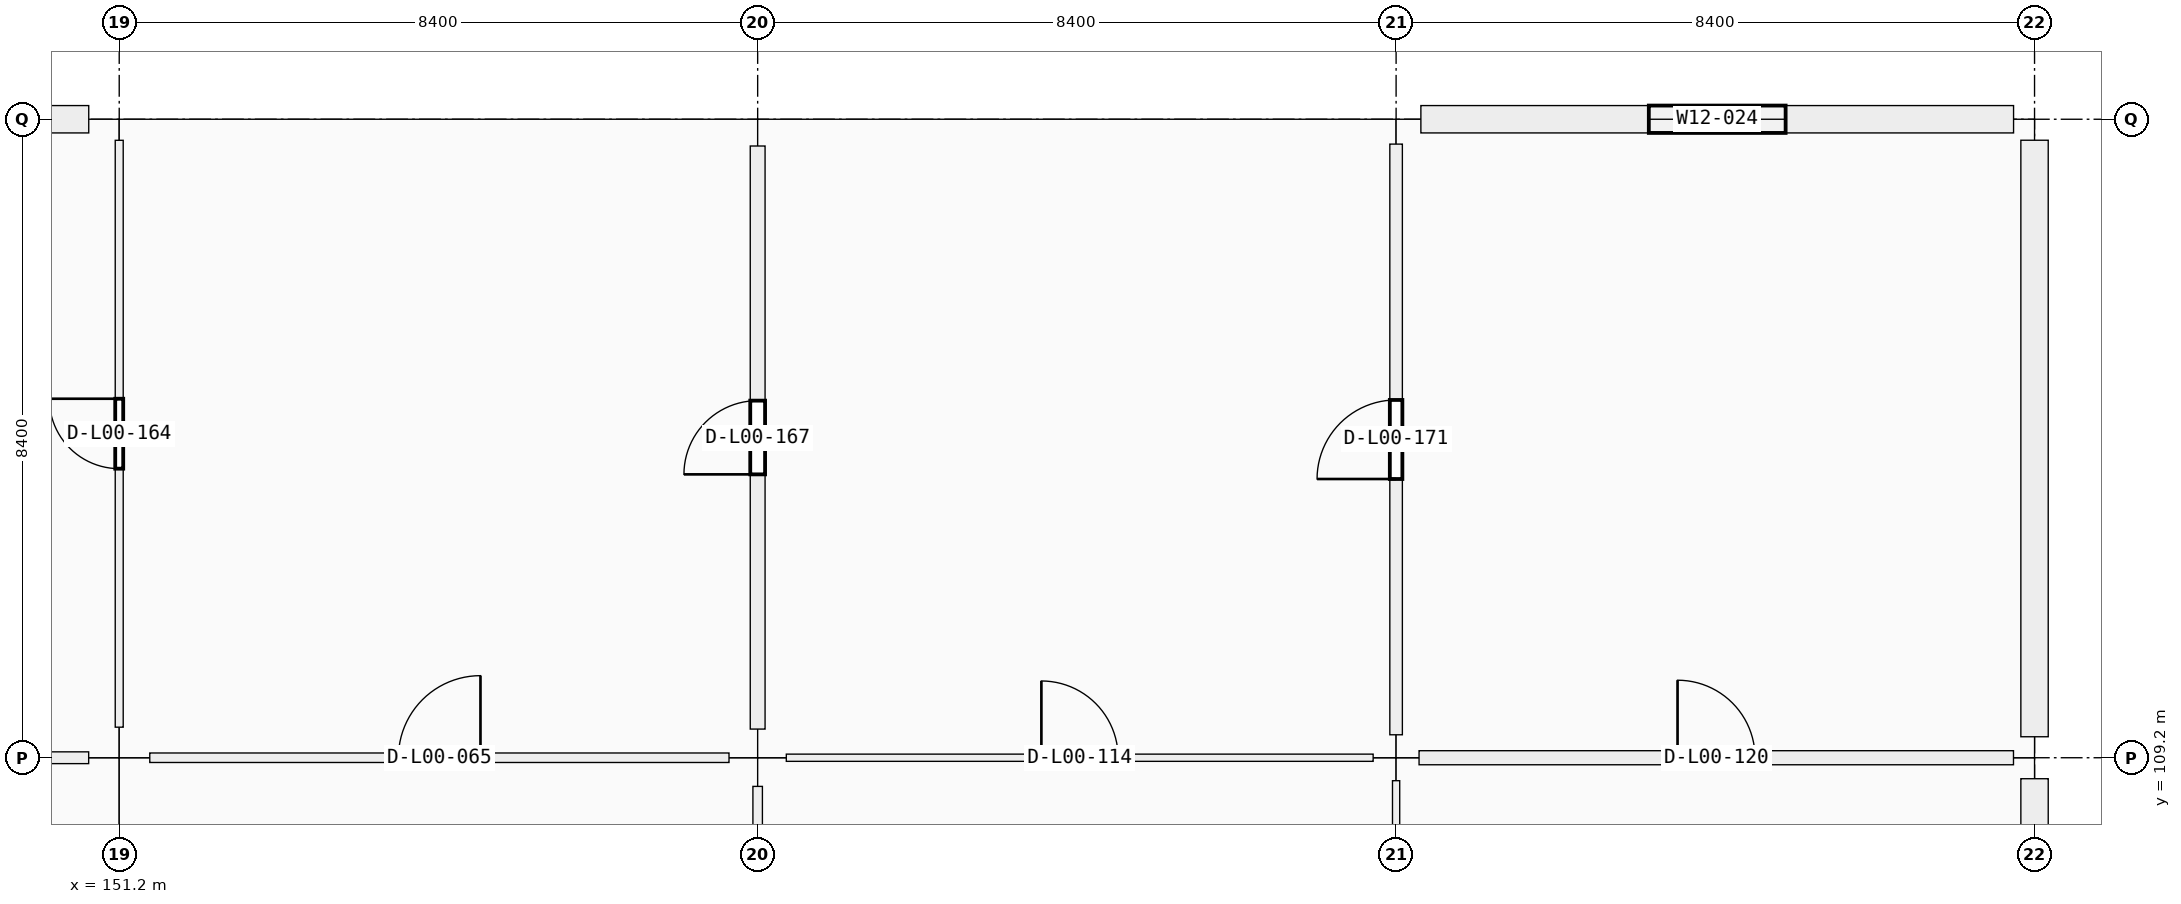
"""IFC4 building model, lengths in metres.
Left out: names, types, materials, properties, quantities, classifications, styles, units other than length and angle.
Written with IfcOpenShell. Run it as: python <this file> out.ifc"""

import sys

from ifc_helpers import new_model, si_unit, direction, frame, frame_2d, origin, origin_2d, place, context, subcontext, project, spatial, rectangle, extrude, element, fill, save


model = new_model("IFC4")
c1 = context("Model", 3, precision=1e-05, world=origin(), true_north=direction((0.0, 1.0)))
c2 = subcontext(c1, "Body", "Model", "MODEL_VIEW")
j1 = project(units=[si_unit("LENGTHUNIT", "METRE"), si_unit("PLANEANGLEUNIT", "RADIAN")], contexts=[c1])
p1 = place(None, origin())
s1 = spatial("IfcSite", under=j1, at=p1, CompositionType="ELEMENT")
p2 = place(p1, origin())
s2 = spatial("IfcBuilding", under=s1, at=p2, CompositionType="ELEMENT")
p3 = place(p2, origin())
s3 = spatial("IfcBuildingStorey", under=s2, at=p3, CompositionType="ELEMENT", Elevation=0.0)
p4 = place(p3, frame((151.2, 109.2, 0.0), z_axis=(0.0, 0.0, 1.0), x_axis=(1.0, 0.0, 0.0)))
e1 = element("IfcColumn", 1, at=p4, inside=s3, PredefinedType="COLUMN", context=c2, shape_type="SweptSolid", body=[
    extrude(rectangle(XDim=0.8, YDim=0.8, at=origin_2d()), origin(), (0.0, 0.0, 1.0), 5.76),
])
p5 = place(p3, frame((151.2, 117.6, 0.0), z_axis=(0.0, 0.0, 1.0), x_axis=(1.0, 0.0, 0.0)))
e2 = element("IfcColumn", 2, at=p5, inside=s3, PredefinedType="COLUMN", context=c2, shape_type="SweptSolid", body=[
    extrude(rectangle(XDim=0.8, YDim=0.55, at=origin_2d()), origin(), (0.0, 0.0, 1.0), 5.76),
])
p6 = place(p3, frame((159.6, 109.2, 0.0), z_axis=(0.0, 0.0, 1.0), x_axis=(1.0, 0.0, 0.0)))
e3 = element("IfcColumn", 3, at=p6, inside=s3, PredefinedType="COLUMN", context=c2, shape_type="SweptSolid", body=[
    extrude(rectangle(XDim=0.75, YDim=0.75, at=origin_2d()), origin(), (0.0, 0.0, 1.0), 5.76),
])
p7 = place(p3, frame((159.6, 117.6, 0.0), z_axis=(0.0, 0.0, 1.0), x_axis=(1.0, 0.0, 0.0)))
e4 = element("IfcColumn", 4, at=p7, inside=s3, PredefinedType="COLUMN", context=c2, shape_type="SweptSolid", body=[
    extrude(rectangle(XDim=0.7, YDim=0.7, at=origin_2d()), origin(), (0.0, 0.0, 1.0), 5.76),
])
p8 = place(p3, frame((168.0, 109.2, 0.0), z_axis=(0.0, 0.0, 1.0), x_axis=(1.0, 0.0, 0.0)))
e5 = element("IfcColumn", 5, at=p8, inside=s3, PredefinedType="COLUMN", context=c2, shape_type="SweptSolid", body=[
    extrude(rectangle(XDim=0.6, YDim=0.6, at=origin_2d()), origin(), (0.0, 0.0, 1.0), 5.76),
])
p9 = place(p3, frame((168.0, 117.6, 0.0), z_axis=(0.0, 0.0, 1.0), x_axis=(1.0, 0.0, 0.0)))
e6 = element("IfcColumn", 6, at=p9, inside=s3, PredefinedType="COLUMN", context=c2, shape_type="SweptSolid", body=[
    extrude(rectangle(XDim=0.65, YDim=0.65, at=origin_2d()), origin(), (0.0, 0.0, 1.0), 5.76),
])
for number, where, z_axis, x_axis in (
    (7, (176.4, 109.2, 0.0), (0.0, 0.0, 1.0), (1.0, 0.0, 0.0)),
    (8, (176.4, 117.6, 0.0), (0.0, 0.0, 1.0), (1.0, 0.0, 0.0)),
):
    element("IfcColumn", number, at=place(p3, frame(where, z_axis=z_axis, x_axis=x_axis)), inside=s3, PredefinedType="COLUMN", context=c2, shape_type="SweptSolid", body=[
        extrude(rectangle(XDim=0.55, YDim=0.55, at=origin_2d()), origin(), (0.0, 0.0, 1.0), 5.51),
    ])
p10 = place(p3, frame((143.201, 117.6, 0.0), z_axis=(0.0, 0.0, 1.0), x_axis=(1.0, 0.0, 0.0)))
e9 = element("IfcWall", 9, at=p10, inside=s3, PredefinedType="SOLIDWALL", context=c2, shape_type="SweptSolid", body=[
    extrude(rectangle(XDim=7.598, YDim=0.36, at=frame_2d((3.799, 0.0))), origin(), (0.0, 0.0, 1.0), 4.7),
])
p11 = place(p10, frame((2.799, 0.0, 0.0)))
e10 = element("IfcOpeningElement", 10, at=p11, cuts=e9, PredefinedType="OPENING", context=c2, shape_type="SweptSolid", body=[
    extrude(rectangle(XDim=2.0, YDim=2.25, at=frame_2d((1.0, 1.125))), frame((0.0, 0.18, 0.0), z_axis=(0.0, -1.0, 0.0), x_axis=(1.0, 0.0, 0.0)), (0.0, 0.0, 1.0), 0.36),
])
p12 = place(p3, frame((176.4, 108.924, 0.0), z_axis=(0.0, 0.0, 1.0), x_axis=(0.0, -1.0, 0.0)))
e11 = element("IfcWall", 11, at=p12, inside=s3, PredefinedType="SOLIDWALL", context=c2, shape_type="SweptSolid", body=[
    extrude(rectangle(XDim=7.848, YDim=0.36, at=frame_2d((3.924, 0.0))), origin(), (0.0, 0.0, 1.0), 4.7),
])
p13 = place(p12, frame((2.824, 0.0, 0.9)))
e12 = element("IfcOpeningElement", 12, at=p13, cuts=e11, PredefinedType="OPENING", context=c2, shape_type="SweptSolid", body=[
    extrude(rectangle(XDim=2.2, YDim=1.35, at=frame_2d((1.1, 0.675))), frame((0.0, 0.18, 0.0), z_axis=(0.0, -1.0, 0.0), x_axis=(1.0, 0.0, 0.0)), (0.0, 0.0, 1.0), 0.36),
])
p14 = place(p3, frame((168.326, 117.6, 0.0), z_axis=(0.0, 0.0, 1.0), x_axis=(1.0, 0.0, 0.0)))
e13 = element("IfcWall", 13, at=p14, inside=s3, PredefinedType="SOLIDWALL", context=c2, shape_type="SweptSolid", body=[
    extrude(rectangle(XDim=7.798, YDim=0.36, at=frame_2d((3.899, 0.0))), origin(), (0.0, 0.0, 1.0), 4.7),
])
p15 = place(p14, frame((2.999, 0.0, 0.9)))
e14 = element("IfcOpeningElement", 14, at=p15, cuts=e13, PredefinedType="OPENING", context=c2, shape_type="SweptSolid", body=[
    extrude(rectangle(XDim=1.8, YDim=1.35, at=frame_2d((0.9, 0.675))), frame((0.0, 0.18, 0.0), z_axis=(0.0, -1.0, 0.0), x_axis=(1.0, 0.0, 0.0)), (0.0, 0.0, 1.0), 0.36),
])
p16 = place(p3, frame((176.4, 117.324, 0.0), z_axis=(0.0, 0.0, 1.0), x_axis=(0.0, -1.0, 0.0)))
e15 = element("IfcWall", 15, at=p16, inside=s3, PredefinedType="SOLIDWALL", context=c2, shape_type="SweptSolid", body=[
    extrude(rectangle(XDim=7.848, YDim=0.36, at=frame_2d((3.924, 0.0))), origin(), (0.0, 0.0, 1.0), 4.7),
])
p17 = place(p16, frame((2.824, 0.0, 0.9)))
e16 = element("IfcOpeningElement", 16, at=p17, cuts=e15, PredefinedType="OPENING", context=c2, shape_type="SweptSolid", body=[
    extrude(rectangle(XDim=2.2, YDim=1.75, at=frame_2d((1.1, 0.875))), frame((0.0, 0.18, 0.0), z_axis=(0.0, -1.0, 0.0), x_axis=(1.0, 0.0, 0.0)), (0.0, 0.0, 1.0), 0.36),
])
p18 = place(p3, frame((143.202, 109.2, 0.0), z_axis=(0.0, 0.0, 1.0), x_axis=(1.0, 0.0, 0.0)))
e17 = element("IfcWall", 17, at=p18, inside=s3, PredefinedType="PARTITIONING", context=c2, shape_type="SweptSolid", body=[
    extrude(rectangle(XDim=7.596, YDim=0.155, at=frame_2d((3.798, 0.0))), origin(), (0.0, 0.0, 1.0), 3.66),
])
p19 = place(p18, frame((3.333, 0.0, 0.0)))
e18 = element("IfcOpeningElement", 18, at=p19, cuts=e17, PredefinedType="OPENING", context=c2, shape_type="SweptSolid", body=[
    extrude(rectangle(XDim=0.93, YDim=2.12, at=frame_2d((0.465, 1.06))), frame((0.0, 0.078, 0.0), z_axis=(0.0, -1.0, 0.0), x_axis=(1.0, 0.0, 0.0)), (0.0, 0.0, 1.0), 0.155),
])
p20 = place(p3, frame((151.602, 109.2, 0.0), z_axis=(0.0, 0.0, 1.0), x_axis=(1.0, 0.0, 0.0)))
e19 = element("IfcWall", 19, at=p20, inside=s3, PredefinedType="PARTITIONING", context=c2, shape_type="SweptSolid", body=[
    extrude(rectangle(XDim=7.621, YDim=0.125, at=frame_2d((3.811, 0.0))), origin(), (0.0, 0.0, 1.0), 3.66),
])
p21 = place(p20, frame((3.271, 0.0, 0.0)))
e20 = element("IfcOpeningElement", 20, at=p21, cuts=e19, PredefinedType="OPENING", context=c2, shape_type="SweptSolid", body=[
    extrude(rectangle(XDim=1.08, YDim=2.25, at=frame_2d((0.54, 1.125))), frame((0.0, 0.062, 0.0), z_axis=(0.0, -1.0, 0.0), x_axis=(1.0, 0.0, 0.0)), (0.0, 0.0, 1.0), 0.125),
])
p22 = place(p3, frame((159.977, 109.2, 0.0), z_axis=(0.0, 0.0, 1.0), x_axis=(1.0, 0.0, 0.0)))
e21 = element("IfcWall", 21, at=p22, inside=s3, PredefinedType="PARTITIONING", context=c2, shape_type="SweptSolid", body=[
    extrude(rectangle(XDim=7.721, YDim=0.095, at=frame_2d((3.86, 0.0))), origin(), (0.0, 0.0, 1.0), 3.66),
])
p23 = place(p22, frame((3.356, 0.0, 0.0)))
e22 = element("IfcOpeningElement", 22, at=p23, cuts=e21, PredefinedType="OPENING", context=c2, shape_type="SweptSolid", body=[
    extrude(rectangle(XDim=1.01, YDim=2.12, at=frame_2d((0.505, 1.06))), frame((0.0, 0.047, 0.0), z_axis=(0.0, -1.0, 0.0), x_axis=(1.0, 0.0, 0.0)), (0.0, 0.0, 1.0), 0.095),
])
p24 = place(p3, frame((168.302, 109.2, 0.0), z_axis=(0.0, 0.0, 1.0), x_axis=(1.0, 0.0, 0.0)))
e23 = element("IfcWall", 23, at=p24, inside=s3, PredefinedType="PARTITIONING", context=c2, shape_type="SweptSolid", body=[
    extrude(rectangle(XDim=7.821, YDim=0.185, at=frame_2d((3.911, 0.0))), origin(), (0.0, 0.0, 1.0), 3.66),
])
p25 = place(p24, frame((3.401, 0.0, 0.0)))
e24 = element("IfcOpeningElement", 24, at=p25, cuts=e23, PredefinedType="OPENING", context=c2, shape_type="SweptSolid", body=[
    extrude(rectangle(XDim=1.02, YDim=2.2, at=frame_2d((0.51, 1.1))), frame((0.0, 0.093, 0.0), z_axis=(0.0, -1.0, 0.0), x_axis=(1.0, 0.0, 0.0)), (0.0, 0.0, 1.0), 0.185),
])
p26 = place(p3, frame((151.2, 109.602, 0.0), z_axis=(0.0, 0.0, 1.0), x_axis=(0.0, 1.0, 0.0)))
e25 = element("IfcWall", 25, at=p26, inside=s3, PredefinedType="PARTITIONING", context=c2, shape_type="SweptSolid", body=[
    extrude(rectangle(XDim=7.721, YDim=0.105, at=frame_2d((3.86, 0.0))), origin(), (0.0, 0.0, 1.0), 3.66),
])
p27 = place(p26, frame((3.401, 0.0, 0.0)))
e26 = element("IfcOpeningElement", 26, at=p27, cuts=e25, PredefinedType="OPENING", context=c2, shape_type="SweptSolid", body=[
    extrude(rectangle(XDim=0.92, YDim=2.15, at=frame_2d((0.46, 1.075))), frame((0.0, 0.052, 0.0), z_axis=(0.0, -1.0, 0.0), x_axis=(1.0, 0.0, 0.0)), (0.0, 0.0, 1.0), 0.105),
])
p28 = place(p3, frame((159.6, 101.152, 0.0), z_axis=(0.0, 0.0, 1.0), x_axis=(0.0, 1.0, 0.0)))
e27 = element("IfcWall", 27, at=p28, inside=s3, PredefinedType="PARTITIONING", context=c2, shape_type="SweptSolid", body=[
    extrude(rectangle(XDim=7.671, YDim=0.125, at=frame_2d((3.835, 0.0))), origin(), (0.0, 0.0, 1.0), 3.66),
])
p29 = place(p28, frame((3.311, 0.0, 0.0)))
e28 = element("IfcOpeningElement", 28, at=p29, cuts=e27, PredefinedType="OPENING", context=c2, shape_type="SweptSolid", body=[
    extrude(rectangle(XDim=1.05, YDim=2.12, at=frame_2d((0.525, 1.06))), frame((0.0, 0.062, 0.0), z_axis=(0.0, -1.0, 0.0), x_axis=(1.0, 0.0, 0.0)), (0.0, 0.0, 1.0), 0.125),
])
p30 = place(p3, frame((159.6, 109.577, 0.0), z_axis=(0.0, 0.0, 1.0), x_axis=(0.0, 1.0, 0.0)))
e29 = element("IfcWall", 29, at=p30, inside=s3, PredefinedType="PARTITIONING", context=c2, shape_type="SweptSolid", body=[
    extrude(rectangle(XDim=7.671, YDim=0.195, at=frame_2d((3.835, 0.0))), origin(), (0.0, 0.0, 1.0), 3.66),
])
p31 = place(p30, frame((3.351, 0.0, 0.0)))
e30 = element("IfcOpeningElement", 30, at=p31, cuts=e29, PredefinedType="OPENING", context=c2, shape_type="SweptSolid", body=[
    extrude(rectangle(XDim=0.97, YDim=2.12, at=frame_2d((0.485, 1.06))), frame((0.0, 0.098, 0.0), z_axis=(0.0, -1.0, 0.0), x_axis=(1.0, 0.0, 0.0)), (0.0, 0.0, 1.0), 0.195),
])
p32 = place(p3, frame((168.0, 101.127, 0.0), z_axis=(0.0, 0.0, 1.0), x_axis=(0.0, 1.0, 0.0)))
e31 = element("IfcWall", 31, at=p32, inside=s3, PredefinedType="PARTITIONING", context=c2, shape_type="SweptSolid", body=[
    extrude(rectangle(XDim=7.771, YDim=0.095, at=frame_2d((3.885, 0.0))), origin(), (0.0, 0.0, 1.0), 3.66),
])
p33 = place(p32, frame((3.385, 0.0, 0.0)))
e32 = element("IfcOpeningElement", 32, at=p33, cuts=e31, PredefinedType="OPENING", context=c2, shape_type="SweptSolid", body=[
    extrude(rectangle(XDim=1.0, YDim=2.2, at=frame_2d((0.5, 1.1))), frame((0.0, 0.047, 0.0), z_axis=(0.0, -1.0, 0.0), x_axis=(1.0, 0.0, 0.0)), (0.0, 0.0, 1.0), 0.095),
])
p34 = place(p3, frame((168.0, 109.502, 0.0), z_axis=(0.0, 0.0, 1.0), x_axis=(0.0, 1.0, 0.0)))
e33 = element("IfcWall", 33, at=p34, inside=s3, PredefinedType="PARTITIONING", context=c2, shape_type="SweptSolid", body=[
    extrude(rectangle(XDim=7.771, YDim=0.165, at=frame_2d((3.885, 0.0))), origin(), (0.0, 0.0, 1.0), 3.66),
])
p35 = place(p34, frame((3.365, 0.0, 0.0)))
e34 = element("IfcOpeningElement", 34, at=p35, cuts=e33, PredefinedType="OPENING", context=c2, shape_type="SweptSolid", body=[
    extrude(rectangle(XDim=1.04, YDim=2.2, at=frame_2d((0.52, 1.1))), frame((0.0, 0.083, 0.0), z_axis=(0.0, -1.0, 0.0), x_axis=(1.0, 0.0, 0.0)), (0.0, 0.0, 1.0), 0.165),
])
p36 = place(p15, origin())
e35 = element("IfcWindow", 35, at=p36, inside=s3, PartitioningType="SINGLE_PANEL", PredefinedType="WINDOW", context=c2, shape_type="SweptSolid", body=[
    extrude(rectangle(XDim=1.8, YDim=1.35, at=frame_2d((0.9, 0.675))), frame((0.0, 0.03, 0.0), z_axis=(0.0, -1.0, 0.0), x_axis=(1.0, 0.0, 0.0)), (0.0, 0.0, 1.0), 0.06),
])
fill(e14, e35)
p37 = place(p17, origin())
e36 = element("IfcWindow", 36, at=p37, inside=s3, PartitioningType="SINGLE_PANEL", PredefinedType="WINDOW", context=c2, shape_type="SweptSolid", body=[
    extrude(rectangle(XDim=2.2, YDim=1.75, at=frame_2d((1.1, 0.875))), frame((0.0, 0.03, 0.0), z_axis=(0.0, -1.0, 0.0), x_axis=(1.0, 0.0, 0.0)), (0.0, 0.0, 1.0), 0.06),
])
fill(e16, e36)
p38 = place(p21, origin())
e37 = element("IfcDoor", 37, at=p38, inside=s3, OperationType="SINGLE_SWING_RIGHT", PredefinedType="DOOR", context=c2, shape_type="SweptSolid", body=[
    extrude(rectangle(XDim=1.08, YDim=2.25, at=frame_2d((0.54, 1.125))), frame((0.0, 0.025, 0.0), z_axis=(0.0, -1.0, 0.0), x_axis=(1.0, 0.0, 0.0)), (0.0, 0.0, 1.0), 0.05),
])
fill(e20, e37)
p39 = place(p23, origin())
e38 = element("IfcDoor", 38, at=p39, inside=s3, OperationType="SINGLE_SWING_LEFT", PredefinedType="DOOR", context=c2, shape_type="SweptSolid", body=[
    extrude(rectangle(XDim=1.01, YDim=2.12, at=frame_2d((0.505, 1.06))), frame((0.0, 0.025, 0.0), z_axis=(0.0, -1.0, 0.0), x_axis=(1.0, 0.0, 0.0)), (0.0, 0.0, 1.0), 0.05),
])
fill(e22, e38)
p40 = place(p25, origin())
e39 = element("IfcDoor", 39, at=p40, inside=s3, OperationType="SINGLE_SWING_LEFT", PredefinedType="DOOR", context=c2, shape_type="SweptSolid", body=[
    extrude(rectangle(XDim=1.02, YDim=2.2, at=frame_2d((0.51, 1.1))), frame((0.0, 0.025, 0.0), z_axis=(0.0, -1.0, 0.0), x_axis=(1.0, 0.0, 0.0)), (0.0, 0.0, 1.0), 0.05),
])
fill(e24, e39)
p41 = place(p27, origin())
e40 = element("IfcDoor", 40, at=p41, inside=s3, OperationType="SINGLE_SWING_RIGHT", PredefinedType="DOOR", context=c2, shape_type="SweptSolid", body=[
    extrude(rectangle(XDim=0.92, YDim=2.15, at=frame_2d((0.46, 1.075))), frame((0.0, 0.025, 0.0), z_axis=(0.0, -1.0, 0.0), x_axis=(1.0, 0.0, 0.0)), (0.0, 0.0, 1.0), 0.05),
])
fill(e26, e40)
p42 = place(p31, origin())
e41 = element("IfcDoor", 41, at=p42, inside=s3, OperationType="SINGLE_SWING_LEFT", PredefinedType="DOOR", context=c2, shape_type="SweptSolid", body=[
    extrude(rectangle(XDim=0.97, YDim=2.12, at=frame_2d((0.485, 1.06))), frame((0.0, 0.025, 0.0), z_axis=(0.0, -1.0, 0.0), x_axis=(1.0, 0.0, 0.0)), (0.0, 0.0, 1.0), 0.05),
])
fill(e30, e41)
p43 = place(p35, origin())
e42 = element("IfcDoor", 42, at=p43, inside=s3, OperationType="SINGLE_SWING_LEFT", PredefinedType="DOOR", context=c2, shape_type="SweptSolid", body=[
    extrude(rectangle(XDim=1.04, YDim=2.2, at=frame_2d((0.52, 1.1))), frame((0.0, 0.025, 0.0), z_axis=(0.0, -1.0, 0.0), x_axis=(1.0, 0.0, 0.0)), (0.0, 0.0, 1.0), 0.05),
])
fill(e34, e42)
save(model, sys.argv[1])
